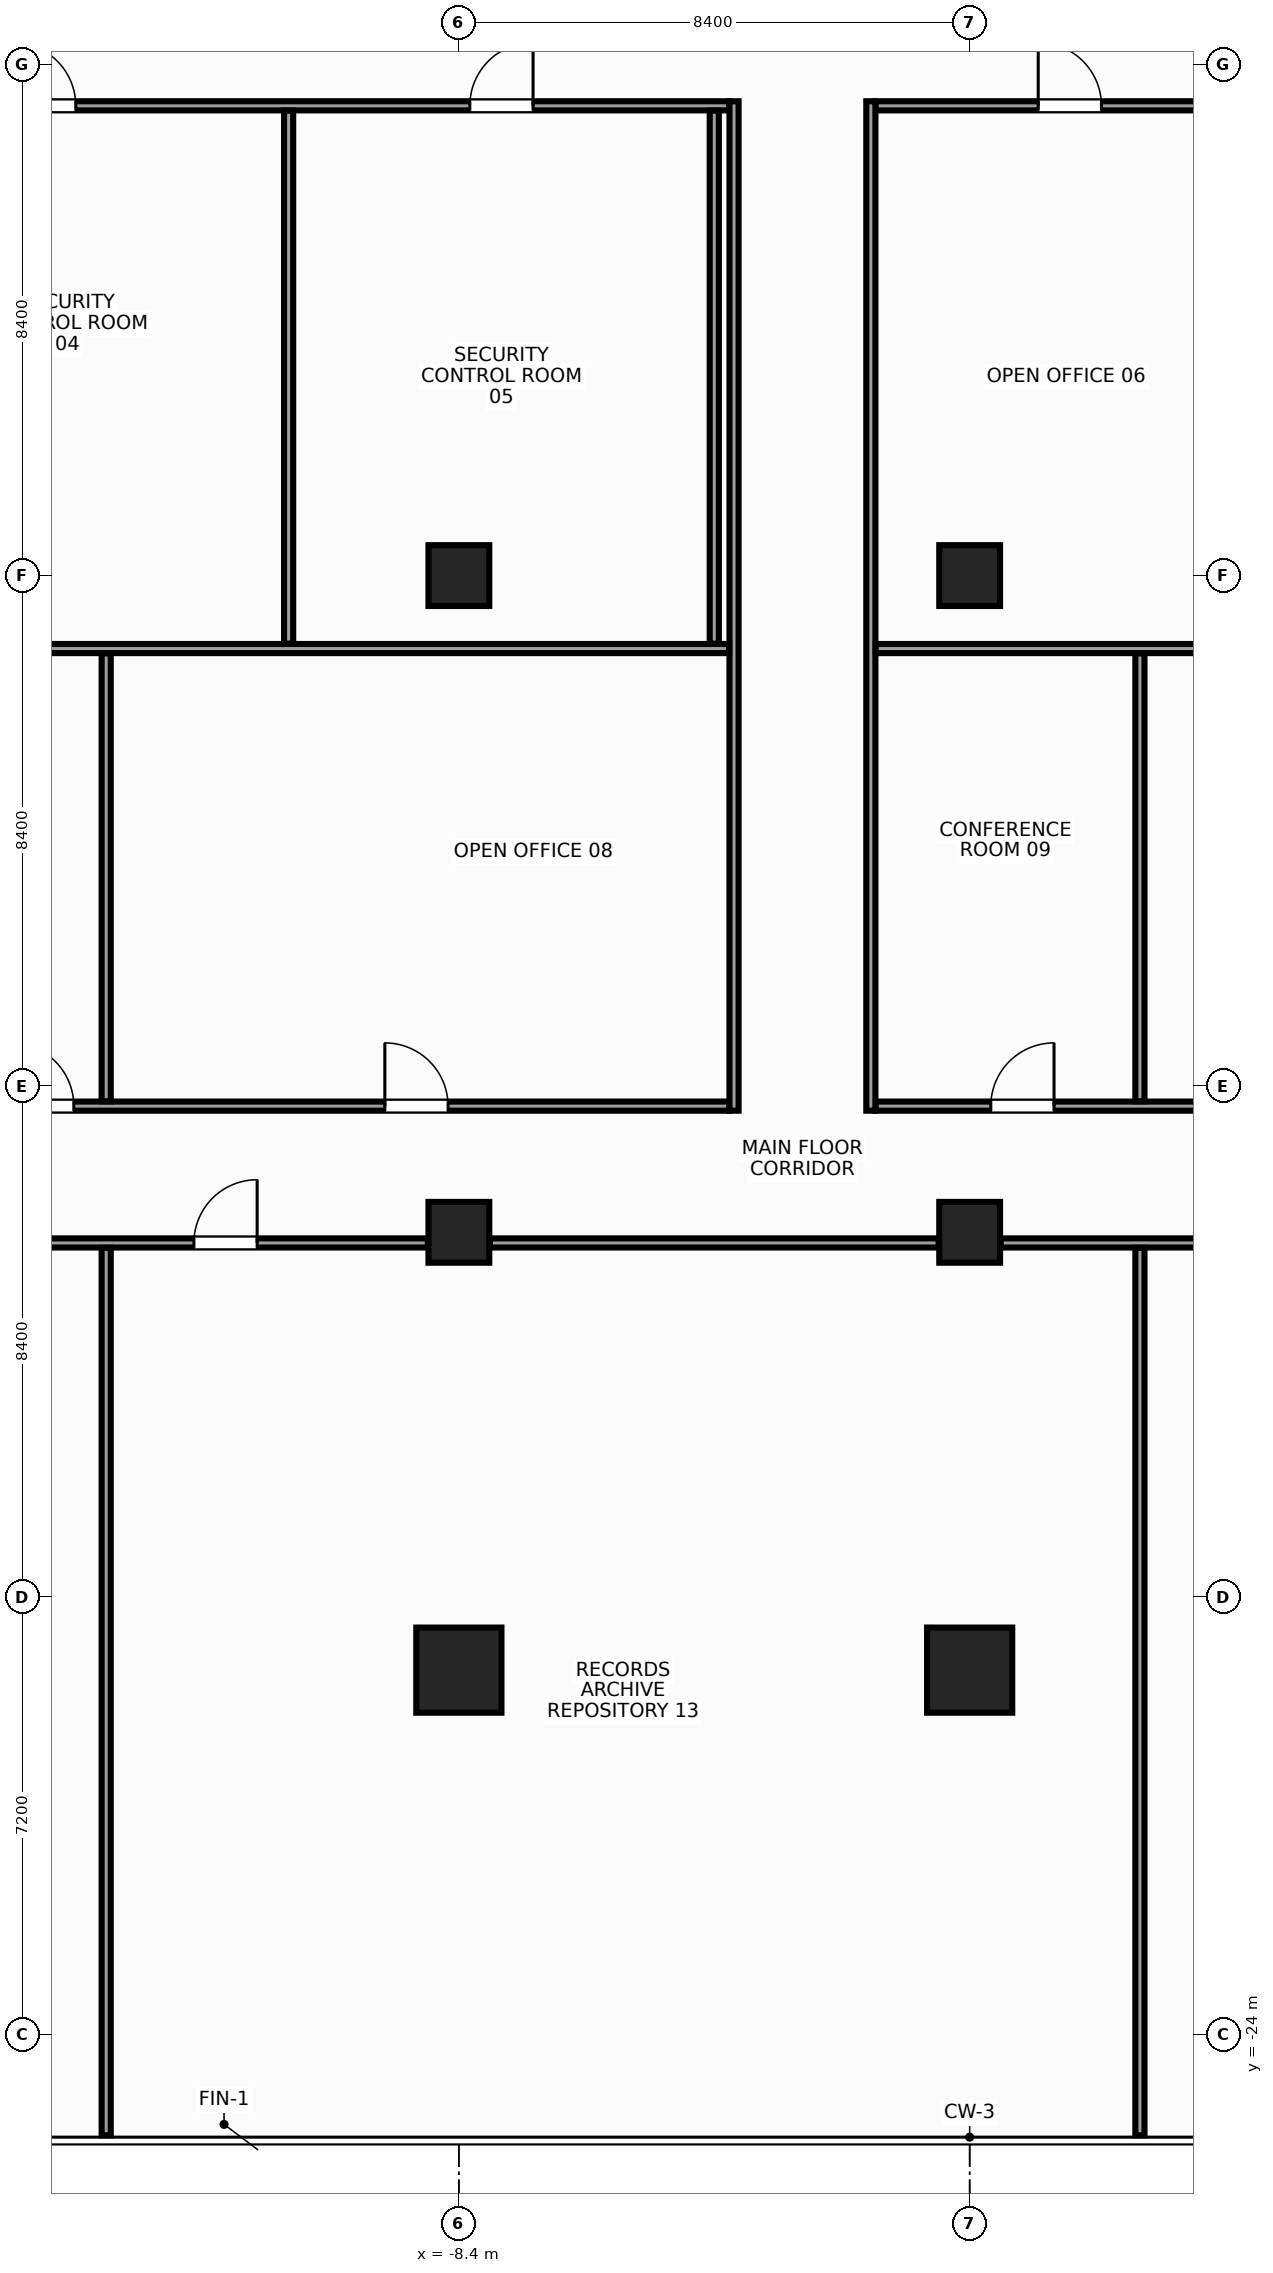
"""IFC4 building model, lengths in metres.
Left out: names, types, materials, properties, quantities, classifications, styles, units other than length and angle.
Written with IfcOpenShell. Run it as: python <this file> out.ifc"""

import sys

from ifc_helpers import new_model, si_unit, direction, frame, frame_2d, origin, origin_2d, place, context, subcontext, project, spatial, rectangle, hollow_rectangle, extrude, source, transform, mapped, element, fill, save


model = new_model("IFC4")
c1 = context("Model", 3, precision=1e-05, world=origin(), true_north=direction((0.0, 1.0)))
c2 = subcontext(c1, "Body", "Model", "MODEL_VIEW")
j1 = project(units=[si_unit("LENGTHUNIT", "METRE"), si_unit("PLANEANGLEUNIT", "RADIAN")], contexts=[c1])
p1 = place(None, origin())
s1 = spatial("IfcSite", under=j1, at=p1, CompositionType="ELEMENT")
p2 = place(p1, origin())
s2 = spatial("IfcBuilding", under=s1, at=p2, CompositionType="ELEMENT")
p3 = place(p2, frame((0.0, 0.0, 99.2)))
s3 = spatial("IfcBuildingStorey", under=s2, at=p3, CompositionType="ELEMENT", Elevation=99.2)
m1 = source(origin(), c2, "Body", "SweptSolid", [
    extrude(rectangle(XDim=1.4, YDim=1.4, at=origin_2d()), origin(), (0.0, 0.0, 1.0), 3.6),
])
p4 = place(p3, frame((-8.4, -18.0, 0.0), z_axis=(0.0, 0.0, 1.0), x_axis=(1.0, 0.0, 0.0)))
e1 = element("IfcColumn", 1, at=p4, inside=s3, PredefinedType="COLUMN", context=c2, shape_type="MappedRepresentation", body=[
    mapped(m1, transform((0.0, 0.0, 0.0), x_axis=(1.0, 0.0, 0.0), y_axis=(0.0, 1.0, 0.0), z_axis=(0.0, 0.0, 1.0), scale=1.0)),
])
m2 = source(origin(), c2, "Body", "SweptSolid", [
    extrude(hollow_rectangle(XDim=1.0, YDim=1.0, WallThickness=0.045, at=origin_2d()), origin(), (0.0, 0.0, 1.0), 3.6),
])
for number, where, z_axis, x_axis in (
    (2, (-8.4, 0.0, 0.0), (0.0, 0.0, 1.0), (1.0, 0.0, 0.0)),
    (3, (-8.4, -10.8, 0.0), (0.0, 0.0, 1.0), (1.0, 0.0, 0.0)),
):
    element("IfcColumn", number, at=place(p3, frame(where, z_axis=z_axis, x_axis=x_axis)), inside=s3, PredefinedType="COLUMN", context=c2, shape_type="MappedRepresentation", body=[
        mapped(m2, transform((0.0, 0.0, 0.0), x_axis=(1.0, 0.0, 0.0), y_axis=(0.0, 1.0, 0.0), z_axis=(0.0, 0.0, 1.0), scale=1.0)),
    ])
p5 = place(p3, frame((0.0, -18.0, 0.0), z_axis=(0.0, 0.0, 1.0), x_axis=(1.0, 0.0, 0.0)))
e4 = element("IfcColumn", 4, at=p5, inside=s3, PredefinedType="COLUMN", context=c2, shape_type="MappedRepresentation", body=[
    mapped(m1, transform((0.0, 0.0, 0.0), x_axis=(1.0, 0.0, 0.0), y_axis=(0.0, 1.0, 0.0), z_axis=(0.0, 0.0, 1.0), scale=1.0)),
])
m3 = source(origin(), c2, "Body", "SweptSolid", [
    extrude(rectangle(XDim=1.0, YDim=1.0, at=origin_2d()), origin(), (0.0, 0.0, 1.0), 3.6),
])
for number, where, z_axis, x_axis in (
    (5, (0.0, -10.8, 0.0), (0.0, 0.0, 1.0), (1.0, 0.0, 0.0)),
    (6, (0.0, 0.0, 0.0), (0.0, 0.0, 1.0), (1.0, 0.0, 0.0)),
):
    element("IfcColumn", number, at=place(p3, frame(where, z_axis=z_axis, x_axis=x_axis)), inside=s3, PredefinedType="COLUMN", context=c2, shape_type="MappedRepresentation", body=[
        mapped(m3, transform((0.0, 0.0, 0.0), x_axis=(1.0, 0.0, 0.0), y_axis=(0.0, 1.0, 0.0), z_axis=(0.0, 0.0, 1.0), scale=1.0)),
    ])
m4 = source(origin(), c2, "Body", "SweptSolid", [
    extrude(rectangle(XDim=16.8, YDim=0.15, at=frame_2d((8.4, 0.0))), origin(), (0.0, 0.0, 1.0), 2.745),
])
p6 = place(p3, frame((-20.75, 7.725, 0.0), z_axis=(0.0, 0.0, 1.0), x_axis=(1.0, 0.0, 0.0)))
e7 = element("IfcWall", 7, at=p6, inside=s3, PredefinedType="PARTITIONING", context=c2, shape_type="MappedRepresentation", body=[
    mapped(m4, transform((0.0, 0.0, 0.0), x_axis=(1.0, 0.0, 0.0), y_axis=(0.0, 1.0, 0.0), z_axis=(0.0, 0.0, 1.0), scale=1.0)),
])
p7 = place(p6, frame((0.478, 0.0, 0.0)))
e8 = element("IfcOpeningElement", 8, at=p7, cuts=e7, PredefinedType="OPENING", context=c2, shape_type="SweptSolid", body=[
    extrude(rectangle(XDim=1.04, YDim=2.2, at=frame_2d((0.52, 1.1))), frame((0.0, 0.087, 0.0), z_axis=(0.0, -1.0, 0.0), x_axis=(1.0, 0.0, 0.0)), (0.0, 0.0, 1.0), 0.174),
])
p8 = place(p6, frame((5.01, 0.0, 0.0)))
e9 = element("IfcOpeningElement", 9, at=p8, cuts=e7, PredefinedType="OPENING", context=c2, shape_type="SweptSolid", body=[
    extrude(rectangle(XDim=1.04, YDim=2.2, at=frame_2d((0.52, 1.1))), frame((0.0, 0.087, 0.0), z_axis=(0.0, -1.0, 0.0), x_axis=(1.0, 0.0, 0.0)), (0.0, 0.0, 1.0), 0.174),
])
p9 = place(p6, frame((12.53, 0.0, 0.0)))
e10 = element("IfcOpeningElement", 10, at=p9, cuts=e7, PredefinedType="OPENING", context=c2, shape_type="SweptSolid", body=[
    extrude(rectangle(XDim=1.04, YDim=2.2, at=frame_2d((0.52, 1.1))), frame((0.0, 0.087, 0.0), z_axis=(0.0, -1.0, 0.0), x_axis=(1.0, 0.0, 0.0)), (0.0, 0.0, 1.0), 0.174),
])
m5 = source(origin(), c2, "Body", "SweptSolid", [
    extrude(rectangle(XDim=22.3, YDim=0.15, at=frame_2d((11.15, 0.0))), origin(), (0.0, 0.0, 1.0), 2.745),
])
p10 = place(p3, frame((-1.55, 7.725, 0.0), z_axis=(0.0, 0.0, 1.0), x_axis=(1.0, 0.0, 0.0)))
e11 = element("IfcWall", 11, at=p10, inside=s3, PredefinedType="PARTITIONING", context=c2, shape_type="MappedRepresentation", body=[
    mapped(m5, transform((0.0, 0.0, 0.0), x_axis=(1.0, 0.0, 0.0), y_axis=(0.0, 1.0, 0.0), z_axis=(0.0, 0.0, 1.0), scale=1.0)),
])
p11 = place(p10, frame((20.952, 0.0, 0.0)))
e12 = element("IfcOpeningElement", 12, at=p11, cuts=e11, PredefinedType="OPENING", context=c2, shape_type="SweptSolid", body=[
    extrude(rectangle(XDim=0.9, YDim=2.15, at=frame_2d((0.45, 1.075))), frame((0.0, 0.087, 0.0), z_axis=(0.0, -1.0, 0.0), x_axis=(1.0, 0.0, 0.0)), (0.0, 0.0, 1.0), 0.174),
])
p12 = place(p10, frame((17.61, 0.0, 0.0)))
e13 = element("IfcOpeningElement", 13, at=p12, cuts=e11, PredefinedType="OPENING", context=c2, shape_type="SweptSolid", body=[
    extrude(rectangle(XDim=1.04, YDim=2.2, at=frame_2d((0.52, 1.1))), frame((0.0, 0.087, 0.0), z_axis=(0.0, -1.0, 0.0), x_axis=(1.0, 0.0, 0.0)), (0.0, 0.0, 1.0), 0.174),
])
p13 = place(p10, frame((2.677, 0.0, 0.0)))
e14 = element("IfcOpeningElement", 14, at=p13, cuts=e11, PredefinedType="OPENING", context=c2, shape_type="SweptSolid", body=[
    extrude(rectangle(XDim=1.04, YDim=2.2, at=frame_2d((0.52, 1.1))), frame((0.0, 0.087, 0.0), z_axis=(0.0, -1.0, 0.0), x_axis=(1.0, 0.0, 0.0)), (0.0, 0.0, 1.0), 0.174),
])
p14 = place(p10, frame((9.63, 0.0, 0.0)))
e15 = element("IfcOpeningElement", 15, at=p14, cuts=e11, PredefinedType="OPENING", context=c2, shape_type="SweptSolid", body=[
    extrude(rectangle(XDim=1.04, YDim=2.2, at=frame_2d((0.52, 1.1))), frame((0.0, 0.087, 0.0), z_axis=(0.0, -1.0, 0.0), x_axis=(1.0, 0.0, 0.0)), (0.0, 0.0, 1.0), 0.174),
])
p15 = place(p3, frame((-20.75, -8.725, 0.0), z_axis=(0.0, 0.0, 1.0), x_axis=(1.0, 0.0, 0.0)))
e16 = element("IfcWall", 16, at=p15, inside=s3, PredefinedType="PARTITIONING", context=c2, shape_type="MappedRepresentation", body=[
    mapped(m4, transform((0.0, 0.0, 0.0), x_axis=(1.0, 0.0, 0.0), y_axis=(0.0, 1.0, 0.0), z_axis=(0.0, 0.0, 1.0), scale=1.0)),
])
p16 = place(p15, frame((11.133, 0.0, 0.0)))
e17 = element("IfcOpeningElement", 17, at=p16, cuts=e16, PredefinedType="OPENING", context=c2, shape_type="SweptSolid", body=[
    extrude(rectangle(XDim=1.04, YDim=2.2, at=frame_2d((0.52, 1.1))), frame((0.0, 0.087, 0.0), z_axis=(0.0, -1.0, 0.0), x_axis=(1.0, 0.0, 0.0)), (0.0, 0.0, 1.0), 0.174),
])
p17 = place(p15, frame((4.978, 0.0, 0.0)))
e18 = element("IfcOpeningElement", 18, at=p17, cuts=e16, PredefinedType="OPENING", context=c2, shape_type="SweptSolid", body=[
    extrude(rectangle(XDim=1.04, YDim=2.2, at=frame_2d((0.52, 1.1))), frame((0.0, 0.087, 0.0), z_axis=(0.0, -1.0, 0.0), x_axis=(1.0, 0.0, 0.0)), (0.0, 0.0, 1.0), 0.174),
])
p18 = place(p3, frame((-1.55, -8.725, 0.0), z_axis=(0.0, 0.0, 1.0), x_axis=(1.0, 0.0, 0.0)))
e19 = element("IfcWall", 19, at=p18, inside=s3, PredefinedType="PARTITIONING", context=c2, shape_type="MappedRepresentation", body=[
    mapped(m5, transform((0.0, 0.0, 0.0), x_axis=(1.0, 0.0, 0.0), y_axis=(0.0, 1.0, 0.0), z_axis=(0.0, 0.0, 1.0), scale=1.0)),
])
p19 = place(p18, frame((1.897, 0.0, 0.0)))
e20 = element("IfcOpeningElement", 20, at=p19, cuts=e19, PredefinedType="OPENING", context=c2, shape_type="SweptSolid", body=[
    extrude(rectangle(XDim=1.04, YDim=2.2, at=frame_2d((0.52, 1.1))), frame((0.0, 0.087, 0.0), z_axis=(0.0, -1.0, 0.0), x_axis=(1.0, 0.0, 0.0)), (0.0, 0.0, 1.0), 0.174),
])
p20 = place(p18, frame((10.23, 0.0, 0.0)))
e21 = element("IfcOpeningElement", 21, at=p20, cuts=e19, PredefinedType="OPENING", context=c2, shape_type="SweptSolid", body=[
    extrude(rectangle(XDim=1.04, YDim=2.2, at=frame_2d((0.52, 1.1))), frame((0.0, 0.087, 0.0), z_axis=(0.0, -1.0, 0.0), x_axis=(1.0, 0.0, 0.0)), (0.0, 0.0, 1.0), 0.174),
])
m6 = source(origin(), c2, "Body", "SweptSolid", [
    extrude(rectangle(XDim=7.08, YDim=0.15, at=frame_2d((3.54, 0.0))), origin(), (0.0, 0.0, 1.0), 2.745),
])
p21 = place(p3, frame((-15.99, -10.975, 0.0), z_axis=(0.0, 0.0, 1.0), x_axis=(1.0, 0.0, 0.0)))
e22 = element("IfcWall", 22, at=p21, inside=s3, PredefinedType="PARTITIONING", context=c2, shape_type="MappedRepresentation", body=[
    mapped(m6, transform((0.0, 0.0, 0.0), x_axis=(1.0, 0.0, 0.0), y_axis=(0.0, 1.0, 0.0), z_axis=(0.0, 0.0, 1.0), scale=1.0)),
])
p22 = place(p21, frame((3.232, 0.0, 0.0)))
e23 = element("IfcOpeningElement", 23, at=p22, cuts=e22, PredefinedType="OPENING", context=c2, shape_type="SweptSolid", body=[
    extrude(rectangle(XDim=1.04, YDim=2.2, at=frame_2d((0.52, 1.1))), frame((0.0, 0.087, 0.0), z_axis=(0.0, -1.0, 0.0), x_axis=(1.0, 0.0, 0.0)), (0.0, 0.0, 1.0), 0.174),
])
m7 = source(origin(), c2, "Body", "SweptSolid", [
    extrude(rectangle(XDim=7.38, YDim=0.15, at=frame_2d((3.69, 0.0))), origin(), (0.0, 0.0, 1.0), 2.745),
])
p23 = place(p3, frame((-7.89, -10.975, 0.0), z_axis=(0.0, 0.0, 1.0), x_axis=(1.0, 0.0, 0.0)))
e24 = element("IfcWall", 24, at=p23, inside=s3, PredefinedType="PARTITIONING", context=c2, shape_type="MappedRepresentation", body=[
    mapped(m7, transform((0.0, 0.0, 0.0), x_axis=(1.0, 0.0, 0.0), y_axis=(0.0, 1.0, 0.0), z_axis=(0.0, 0.0, 1.0), scale=1.0)),
])
p24 = place(p3, frame((0.51, -10.975, 0.0), z_axis=(0.0, 0.0, 1.0), x_axis=(1.0, 0.0, 0.0)))
e25 = element("IfcWall", 25, at=p24, inside=s3, PredefinedType="PARTITIONING", context=c2, shape_type="MappedRepresentation", body=[
    mapped(m7, transform((0.0, 0.0, 0.0), x_axis=(1.0, 0.0, 0.0), y_axis=(0.0, 1.0, 0.0), z_axis=(0.0, 0.0, 1.0), scale=1.0)),
])
p25 = place(p24, frame((4.732, 0.0, 0.0)))
e26 = element("IfcOpeningElement", 26, at=p25, cuts=e25, PredefinedType="OPENING", context=c2, shape_type="SweptSolid", body=[
    extrude(rectangle(XDim=1.04, YDim=2.2, at=frame_2d((0.52, 1.1))), frame((0.0, 0.087, 0.0), z_axis=(0.0, -1.0, 0.0), x_axis=(1.0, 0.0, 0.0)), (0.0, 0.0, 1.0), 0.174),
])
m8 = source(origin(), c2, "Body", "SweptSolid", [
    extrude(rectangle(XDim=16.6, YDim=0.15, at=frame_2d((8.3, 0.0))), origin(), (0.0, 0.0, 1.0), 2.645),
])
for number, where, z_axis, x_axis in (
    (27, (-3.875, -8.8, 0.0), (0.0, 0.0, 1.0), (0.0, 1.0, 0.0)),
    (28, (-1.625, -8.8, 0.0), (0.0, 0.0, 1.0), (0.0, 1.0, 0.0)),
):
    element("IfcWall", number, at=place(p3, frame(where, z_axis=z_axis, x_axis=x_axis)), inside=s3, PredefinedType="PARTITIONING", context=c2, shape_type="MappedRepresentation", body=[
        mapped(m8, transform((0.0, 0.0, 0.0), x_axis=(1.0, 0.0, 0.0), y_axis=(0.0, 1.0, 0.0), z_axis=(0.0, 0.0, 1.0), scale=1.0)),
    ])
m9 = source(origin(), c2, "Body", "SweptSolid", [
    extrude(rectangle(XDim=21.395, YDim=0.15, at=frame_2d((10.698, 0.0))), origin(), (0.0, 0.0, 1.0), 2.745),
])
p26 = place(p3, frame((-25.35, -1.2, 0.0), z_axis=(0.0, 0.0, 1.0), x_axis=(1.0, 0.0, 0.0)))
e29 = element("IfcWall", 29, at=p26, inside=s3, PredefinedType="PARTITIONING", context=c2, shape_type="MappedRepresentation", body=[
    mapped(m9, transform((0.0, 0.0, 0.0), x_axis=(1.0, 0.0, 0.0), y_axis=(0.0, 1.0, 0.0), z_axis=(0.0, 0.0, 1.0), scale=1.0)),
])
m10 = source(origin(), c2, "Body", "SweptSolid", [
    extrude(rectangle(XDim=26.895, YDim=0.15, at=frame_2d((13.448, 0.0))), origin(), (0.0, 0.0, 1.0), 2.745),
])
p27 = place(p3, frame((-1.545, -1.2, 0.0), z_axis=(0.0, 0.0, 1.0), x_axis=(1.0, 0.0, 0.0)))
e30 = element("IfcWall", 30, at=p27, inside=s3, PredefinedType="PARTITIONING", context=c2, shape_type="MappedRepresentation", body=[
    mapped(m10, transform((0.0, 0.0, 0.0), x_axis=(1.0, 0.0, 0.0), y_axis=(0.0, 1.0, 0.0), z_axis=(0.0, 0.0, 1.0), scale=1.0)),
])
m11 = source(origin(), c2, "Body", "SweptSolid", [
    extrude(rectangle(XDim=8.765, YDim=0.15, at=frame_2d((4.383, 0.0))), origin(), (0.0, 0.0, 1.0), 2.645),
])
for number, where, z_axis, x_axis in (
    (31, (-11.2, -1.12, 0.0), (0.0, 0.0, 1.0), (0.0, 1.0, 0.0)),
    (32, (-4.2, -1.12, 0.0), (0.0, 0.0, 1.0), (0.0, 1.0, 0.0)),
):
    element("IfcWall", number, at=place(p3, frame(where, z_axis=z_axis, x_axis=x_axis)), inside=s3, PredefinedType="PARTITIONING", context=c2, shape_type="MappedRepresentation", body=[
        mapped(m11, transform((0.0, 0.0, 0.0), x_axis=(1.0, 0.0, 0.0), y_axis=(0.0, 1.0, 0.0), z_axis=(0.0, 0.0, 1.0), scale=1.0)),
    ])
m12 = source(origin(), c2, "Body", "SweptSolid", [
    extrude(rectangle(XDim=14.595, YDim=0.15, at=frame_2d((7.297, 0.0))), origin(), (0.0, 0.0, 1.0), 2.745),
])
p28 = place(p3, frame((-14.2, -25.65, 0.0), z_axis=(0.0, 0.0, 1.0), x_axis=(0.0, 1.0, 0.0)))
e33 = element("IfcWall", 33, at=p28, inside=s3, PredefinedType="PARTITIONING", context=c2, shape_type="MappedRepresentation", body=[
    mapped(m12, transform((0.0, 0.0, 0.0), x_axis=(1.0, 0.0, 0.0), y_axis=(0.0, 1.0, 0.0), z_axis=(0.0, 0.0, 1.0), scale=1.0)),
])
m13 = source(origin(), c2, "Body", "SweptSolid", [
    extrude(rectangle(XDim=7.365, YDim=0.15, at=frame_2d((3.683, 0.0))), origin(), (0.0, 0.0, 1.0), 3.36),
])
p29 = place(p3, frame((-14.2, -8.645, 0.0), z_axis=(0.0, 0.0, 1.0), x_axis=(0.0, 1.0, 0.0)))
e34 = element("IfcWall", 34, at=p29, inside=s3, PredefinedType="PARTITIONING", context=c2, shape_type="MappedRepresentation", body=[
    mapped(m13, transform((0.0, 0.0, 0.0), x_axis=(1.0, 0.0, 0.0), y_axis=(0.0, 1.0, 0.0), z_axis=(0.0, 0.0, 1.0), scale=1.0)),
])
p30 = place(p3, frame((2.8, -25.65, 0.0), z_axis=(0.0, 0.0, 1.0), x_axis=(0.0, 1.0, 0.0)))
e35 = element("IfcWall", 35, at=p30, inside=s3, PredefinedType="PARTITIONING", context=c2, shape_type="MappedRepresentation", body=[
    mapped(m12, transform((0.0, 0.0, 0.0), x_axis=(1.0, 0.0, 0.0), y_axis=(0.0, 1.0, 0.0), z_axis=(0.0, 0.0, 1.0), scale=1.0)),
])
p31 = place(p3, frame((2.8, -8.645, 0.0), z_axis=(0.0, 0.0, 1.0), x_axis=(0.0, 1.0, 0.0)))
e36 = element("IfcWall", 36, at=p31, inside=s3, PredefinedType="PARTITIONING", context=c2, shape_type="MappedRepresentation", body=[
    mapped(m13, transform((0.0, 0.0, 0.0), x_axis=(1.0, 0.0, 0.0), y_axis=(0.0, 1.0, 0.0), z_axis=(0.0, 0.0, 1.0), scale=1.0)),
])
m14 = source(origin(), c2, "Body", "SweptSolid", [
    extrude(rectangle(XDim=1.04, YDim=2.2, at=frame_2d((0.52, 1.1))), frame((0.0, 0.025, 0.0), z_axis=(0.0, -1.0, 0.0), x_axis=(1.0, 0.0, 0.0)), (0.0, 0.0, 1.0), 0.05),
])
p32 = place(p8, origin())
e37 = element("IfcDoor", 37, at=p32, inside=s3, OperationType="SINGLE_SWING_LEFT", PredefinedType="DOOR", context=c2, shape_type="MappedRepresentation", body=[
    mapped(m14, transform((0.0, 0.0, 0.0), x_axis=(1.0, 0.0, 0.0), y_axis=(0.0, 1.0, 0.0), z_axis=(0.0, 0.0, 1.0), scale=1.0)),
])
fill(e9, e37)
p33 = place(p9, origin())
e38 = element("IfcDoor", 38, at=p33, inside=s3, OperationType="SINGLE_SWING_RIGHT", PredefinedType="DOOR", context=c2, shape_type="MappedRepresentation", body=[
    mapped(m14, transform((0.0, 0.0, 0.0), x_axis=(1.0, 0.0, 0.0), y_axis=(0.0, 1.0, 0.0), z_axis=(0.0, 0.0, 1.0), scale=1.0)),
])
fill(e10, e38)
p34 = place(p13, origin())
e39 = element("IfcDoor", 39, at=p34, inside=s3, OperationType="SINGLE_SWING_LEFT", PredefinedType="DOOR", context=c2, shape_type="MappedRepresentation", body=[
    mapped(m14, transform((0.0, 0.0, 0.0), x_axis=(1.0, 0.0, 0.0), y_axis=(0.0, 1.0, 0.0), z_axis=(0.0, 0.0, 1.0), scale=1.0)),
])
fill(e14, e39)
p35 = place(p16, origin())
e40 = element("IfcDoor", 40, at=p35, inside=s3, OperationType="SINGLE_SWING_LEFT", PredefinedType="DOOR", context=c2, shape_type="MappedRepresentation", body=[
    mapped(m14, transform((0.0, 0.0, 0.0), x_axis=(1.0, 0.0, 0.0), y_axis=(0.0, 1.0, 0.0), z_axis=(0.0, 0.0, 1.0), scale=1.0)),
])
fill(e17, e40)
p36 = place(p19, origin())
e41 = element("IfcDoor", 41, at=p36, inside=s3, OperationType="SINGLE_SWING_RIGHT", PredefinedType="DOOR", context=c2, shape_type="MappedRepresentation", body=[
    mapped(m14, transform((0.0, 0.0, 0.0), x_axis=(1.0, 0.0, 0.0), y_axis=(0.0, 1.0, 0.0), z_axis=(0.0, 0.0, 1.0), scale=1.0)),
])
fill(e20, e41)
p37 = place(p17, origin())
e42 = element("IfcDoor", 42, at=p37, inside=s3, OperationType="SINGLE_SWING_LEFT", PredefinedType="DOOR", context=c2, shape_type="MappedRepresentation", body=[
    mapped(m14, transform((0.0, 0.0, 0.0), x_axis=(1.0, 0.0, 0.0), y_axis=(0.0, 1.0, 0.0), z_axis=(0.0, 0.0, 1.0), scale=1.0)),
])
fill(e18, e42)
p38 = place(p22, origin())
e43 = element("IfcDoor", 43, at=p38, inside=s3, OperationType="SINGLE_SWING_RIGHT", PredefinedType="DOOR", context=c2, shape_type="MappedRepresentation", body=[
    mapped(m14, transform((0.0, 0.0, 0.0), x_axis=(1.0, 0.0, 0.0), y_axis=(0.0, 1.0, 0.0), z_axis=(0.0, 0.0, 1.0), scale=1.0)),
])
fill(e23, e43)
save(model, sys.argv[1])
